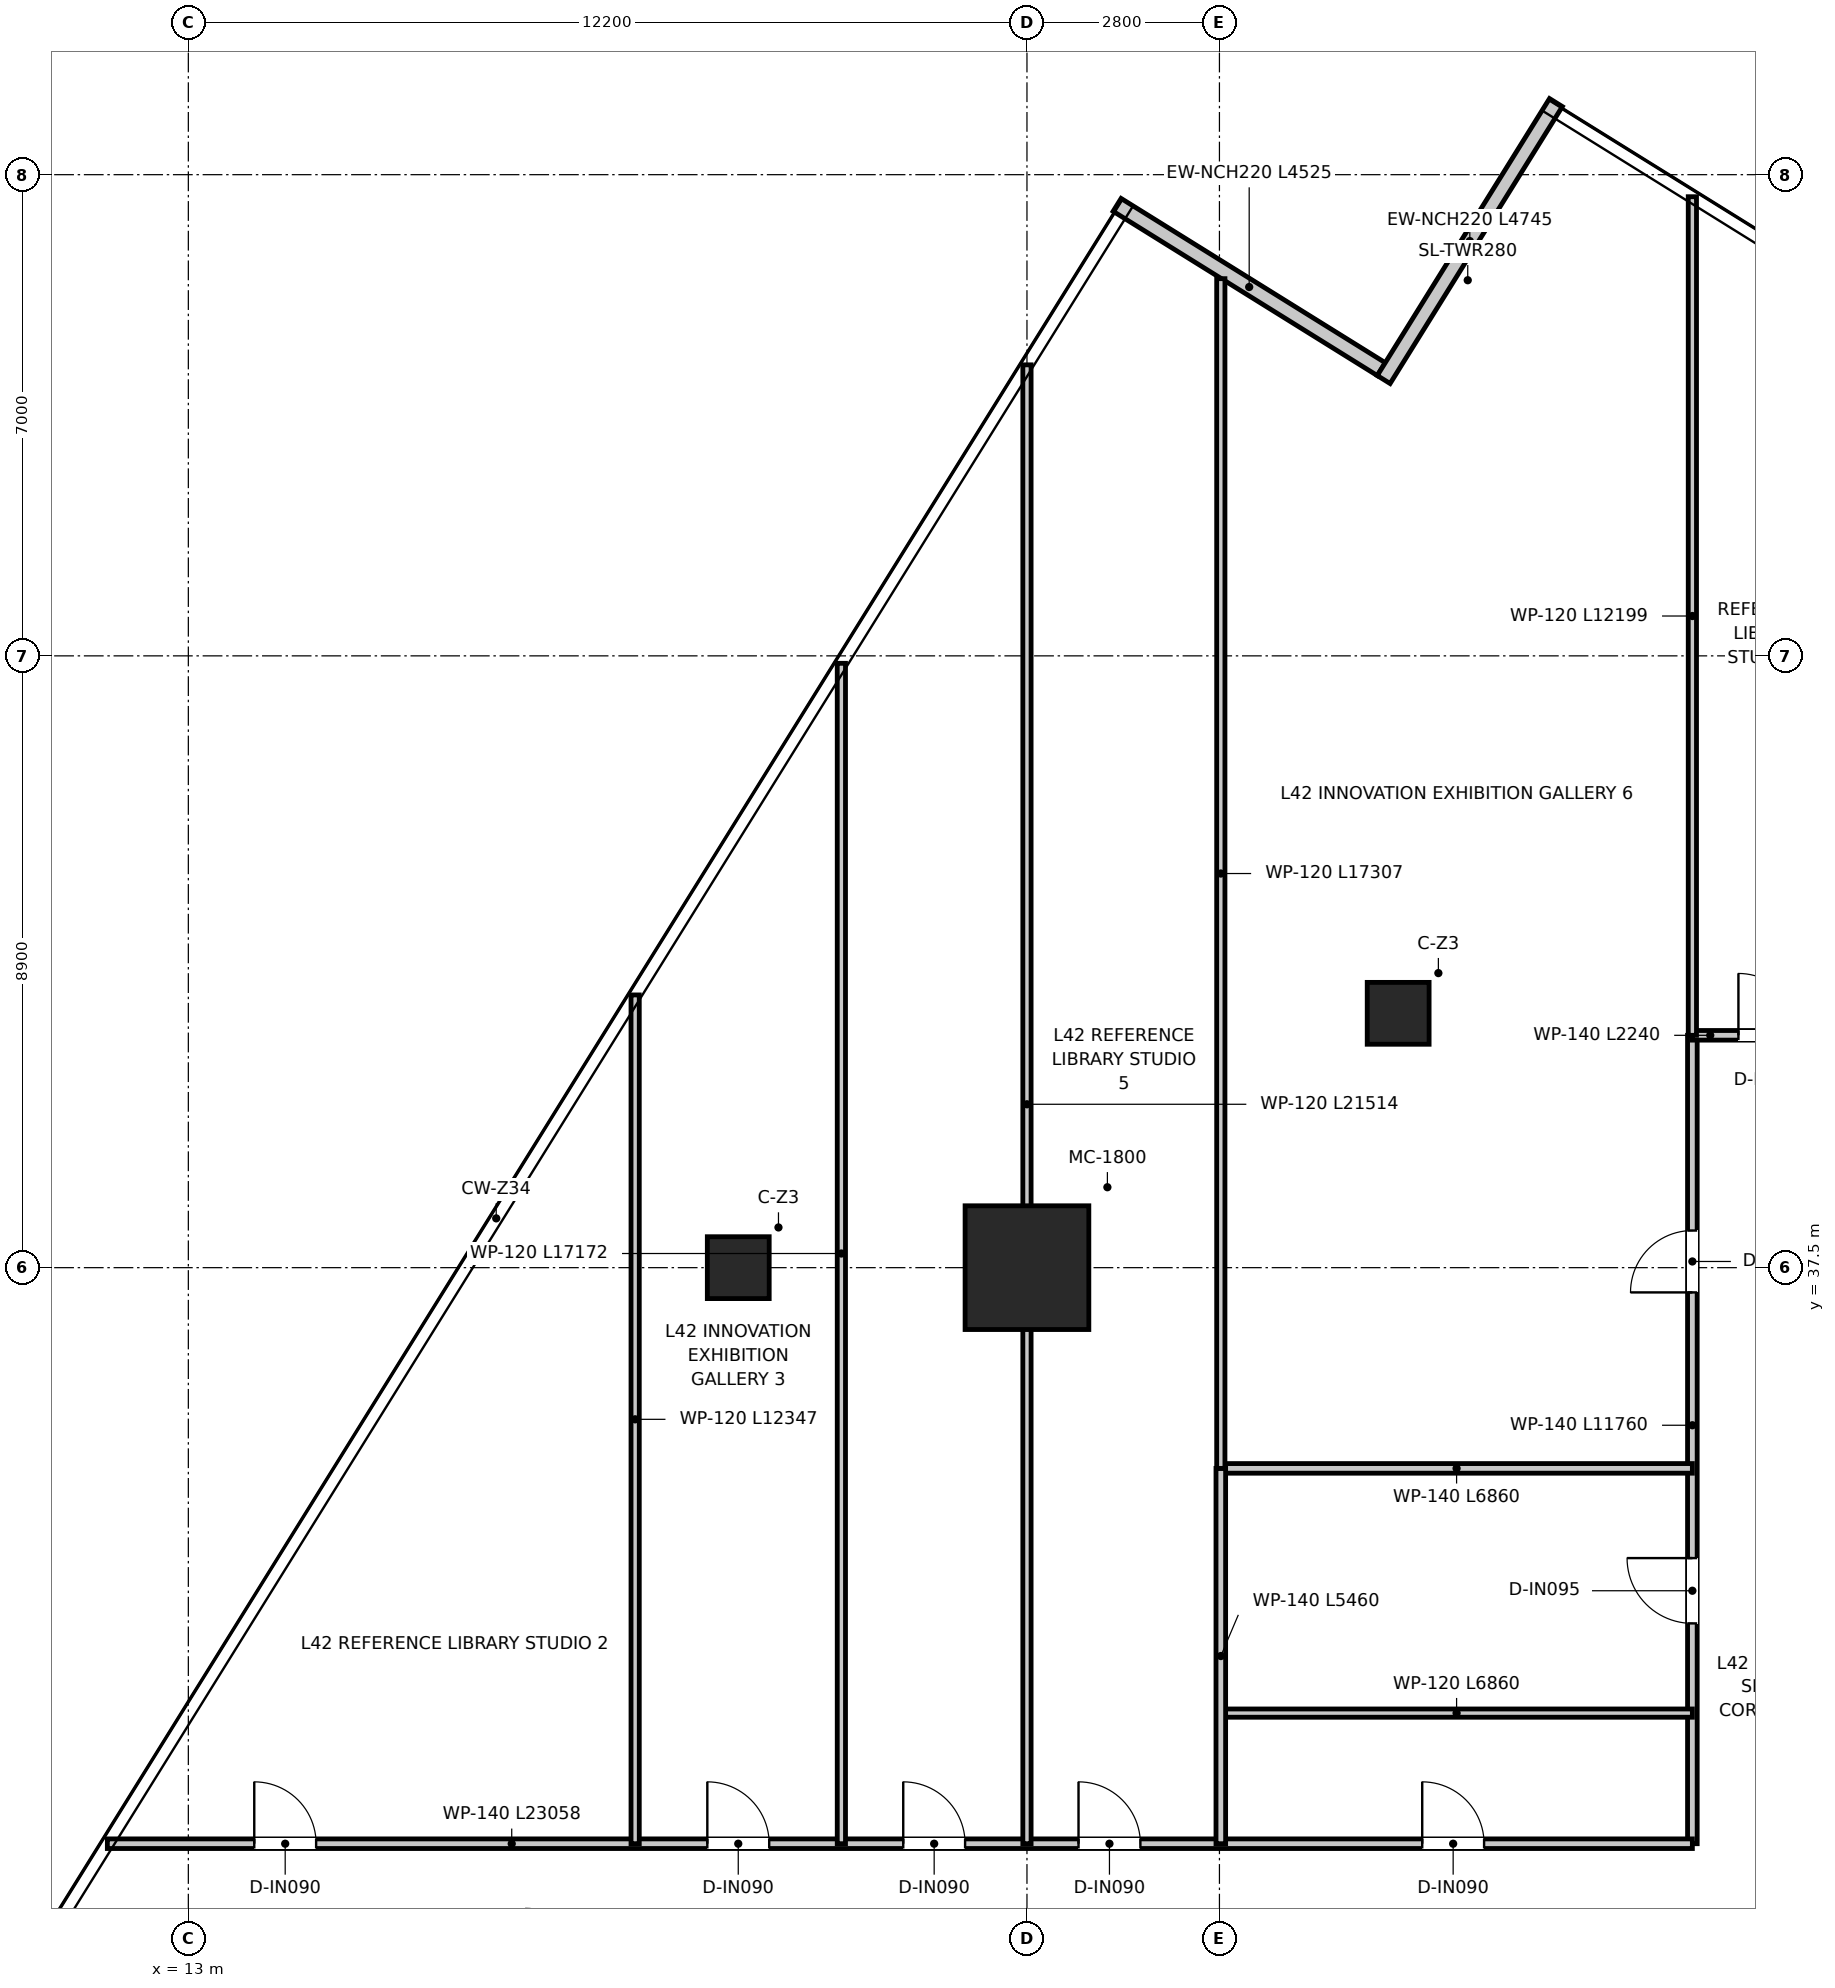
"""IFC4 building model, lengths in metres.
Left out: names, types, materials, properties, quantities, classifications, styles, units other than length and angle.
Written with IfcOpenShell. Run it as: python <this file> out.ifc"""

import sys

from ifc_helpers import new_model, si_unit, direction, frame, frame_2d, origin, origin_2d, place, context, subcontext, project, spatial, rectangle, extrude, source, transform, mapped, element, fill, save


model = new_model("IFC4")
c1 = context("Model", 3, precision=1e-05, world=origin(), true_north=direction((0.0, 1.0)))
c2 = subcontext(c1, "Body", "Model", "MODEL_VIEW")
j1 = project(units=[si_unit("LENGTHUNIT", "METRE"), si_unit("PLANEANGLEUNIT", "RADIAN")], contexts=[c1])
p1 = place(None, origin())
s1 = spatial("IfcSite", under=j1, at=p1, CompositionType="ELEMENT")
p2 = place(p1, origin())
s2 = spatial("IfcBuilding", under=s1, at=p2, CompositionType="ELEMENT")
p3 = place(p2, frame((0.0, 0.0, 173.85)))
s3 = spatial("IfcBuildingStorey", under=s2, at=p3, CompositionType="ELEMENT", Elevation=173.85)
m1 = source(origin(), c2, "Body", "SweptSolid", [
    extrude(rectangle(XDim=1.8, YDim=1.8, at=origin_2d()), origin(), (0.0, 0.0, 1.0), 3.95),
])
p4 = place(p3, frame((25.2, 37.5, 0.0), z_axis=(0.0, 0.0, 1.0), x_axis=(1.0, 0.0, 0.0)))
e1 = element("IfcColumn", 1, at=p4, inside=s3, PredefinedType="USERDEFINED", context=c2, shape_type="MappedRepresentation", body=[
    mapped(m1, transform((0.0, 0.0, 0.0), x_axis=(1.0, 0.0, 0.0), y_axis=(0.0, 1.0, 0.0), z_axis=(0.0, 0.0, 1.0), scale=1.0)),
])
m2 = source(origin(), c2, "Body", "SweptSolid", [
    extrude(rectangle(XDim=0.9, YDim=0.9, at=origin_2d()), origin(), (0.0, 0.0, 1.0), 3.95),
])
for number, where, z_axis, x_axis in (
    (2, (21.0, 37.5, 0.0), (0.0, 0.0, 1.0), (1.0, 0.0, 0.0)),
    (3, (30.6, 41.2, 0.0), (0.0, 0.0, 1.0), (1.0, 0.0, 0.0)),
):
    element("IfcColumn", number, at=place(p3, frame(where, z_axis=z_axis, x_axis=x_axis)), inside=s3, PredefinedType="COLUMN", context=c2, shape_type="MappedRepresentation", body=[
        mapped(m2, transform((0.0, 0.0, 0.0), x_axis=(1.0, 0.0, 0.0), y_axis=(0.0, 1.0, 0.0), z_axis=(0.0, 0.0, 1.0), scale=1.0)),
    ])
p5 = place(p3, frame((30.354, 50.571, 0.0), z_axis=(0.0, 0.0, 1.0), x_axis=(-0.849196398465, 0.528077150456, 0.0)))
e4 = element("IfcWall", 4, at=p5, inside=s3, PredefinedType="ELEMENTEDWALL", context=c2, shape_type="SweptSolid", body=[
    extrude(rectangle(XDim=4.525, YDim=0.22, at=frame_2d((2.263, 0.0))), origin(), (0.0, 0.0, 1.0), 3.67),
])
p6 = place(p3, frame((32.895, 54.449, 0.0), z_axis=(0.0, 0.0, 1.0), x_axis=(-0.528110642948, -0.849175570071, 0.0)))
e5 = element("IfcWall", 5, at=p6, inside=s3, PredefinedType="ELEMENTEDWALL", context=c2, shape_type="SweptSolid", body=[
    extrude(rectangle(XDim=4.745, YDim=0.22, at=frame_2d((2.373, 0.0))), origin(), (0.0, 0.0, 1.0), 3.67),
])
p7 = place(p3, frame((34.88, 29.12, 0.0), z_axis=(0.0, 0.0, 1.0), x_axis=(0.0, 1.0, 0.0)))
e6 = element("IfcWall", 6, at=p7, inside=s3, PredefinedType="PARTITIONING", context=c2, shape_type="SweptSolid", body=[
    extrude(rectangle(XDim=11.76, YDim=0.14, at=frame_2d((5.88, 0.0))), origin(), (0.0, 0.0, 1.0), 3.03),
])
p8 = place(p7, frame((3.205, 0.0, 0.0)))
e7 = element("IfcOpeningElement", 7, at=p8, cuts=e6, PredefinedType="OPENING", context=c2, shape_type="SweptSolid", body=[
    extrude(rectangle(XDim=0.95, YDim=2.1, at=frame_2d((0.475, 1.05))), frame((0.0, 0.08, 0.0), z_axis=(0.0, -1.0, 0.0), x_axis=(1.0, 0.0, 0.0)), (0.0, 0.0, 1.0), 0.16),
])
p9 = place(p7, frame((8.02, 0.0, 0.0)))
e8 = element("IfcOpeningElement", 8, at=p9, cuts=e6, PredefinedType="OPENING", context=c2, shape_type="SweptSolid", body=[
    extrude(rectangle(XDim=0.9, YDim=2.1, at=frame_2d((0.45, 1.05))), frame((0.0, 0.08, 0.0), z_axis=(0.0, -1.0, 0.0), x_axis=(1.0, 0.0, 0.0)), (0.0, 0.0, 1.0), 0.16),
])
p10 = place(p3, frame((34.88, 40.88, 0.0), z_axis=(0.0, 0.0, 1.0), x_axis=(1.0, 0.0, 0.0)))
e9 = element("IfcWall", 9, at=p10, inside=s3, PredefinedType="PARTITIONING", context=c2, shape_type="SweptSolid", body=[
    extrude(rectangle(XDim=2.24, YDim=0.14, at=frame_2d((1.12, 0.0))), origin(), (0.0, 0.0, 1.0), 3.67),
])
p11 = place(p10, frame((0.67, 0.0, 0.0)))
e10 = element("IfcOpeningElement", 10, at=p11, cuts=e9, PredefinedType="OPENING", context=c2, shape_type="SweptSolid", body=[
    extrude(rectangle(XDim=0.9, YDim=2.1, at=frame_2d((0.45, 1.05))), frame((0.0, 0.08, 0.0), z_axis=(0.0, -1.0, 0.0), x_axis=(1.0, 0.0, 0.0)), (0.0, 0.0, 1.0), 0.16),
])
p12 = place(p3, frame((11.822, 29.12, 0.0), z_axis=(0.0, 0.0, 1.0), x_axis=(1.0, 0.0, 0.0)))
e11 = element("IfcWall", 11, at=p12, inside=s3, PredefinedType="PARTITIONING", context=c2, shape_type="SweptSolid", body=[
    extrude(rectangle(XDim=23.058, YDim=0.14, at=frame_2d((11.529, 0.0))), origin(), (0.0, 0.0, 1.0), 3.03),
])
p13 = place(p12, frame((19.128, 0.0, 0.0)))
e12 = element("IfcOpeningElement", 12, at=p13, cuts=e11, PredefinedType="OPENING", context=c2, shape_type="SweptSolid", body=[
    extrude(rectangle(XDim=0.9, YDim=2.1, at=frame_2d((0.45, 1.05))), frame((0.0, 0.08, 0.0), z_axis=(0.0, -1.0, 0.0), x_axis=(1.0, 0.0, 0.0)), (0.0, 0.0, 1.0), 0.16),
])
p14 = place(p12, frame((2.137, 0.0, 0.0)))
e13 = element("IfcOpeningElement", 13, at=p14, cuts=e11, PredefinedType="OPENING", context=c2, shape_type="SweptSolid", body=[
    extrude(rectangle(XDim=0.9, YDim=2.1, at=frame_2d((0.45, 1.05))), frame((0.0, 0.08, 0.0), z_axis=(0.0, -1.0, 0.0), x_axis=(1.0, 0.0, 0.0)), (0.0, 0.0, 1.0), 0.16),
])
p15 = place(p12, frame((8.728, 0.0, 0.0)))
e14 = element("IfcOpeningElement", 14, at=p15, cuts=e11, PredefinedType="OPENING", context=c2, shape_type="SweptSolid", body=[
    extrude(rectangle(XDim=0.9, YDim=2.1, at=frame_2d((0.45, 1.05))), frame((0.0, 0.08, 0.0), z_axis=(0.0, -1.0, 0.0), x_axis=(1.0, 0.0, 0.0)), (0.0, 0.0, 1.0), 0.16),
])
p16 = place(p12, frame((11.578, 0.0, 0.0)))
e15 = element("IfcOpeningElement", 15, at=p16, cuts=e11, PredefinedType="OPENING", context=c2, shape_type="SweptSolid", body=[
    extrude(rectangle(XDim=0.9, YDim=2.1, at=frame_2d((0.45, 1.05))), frame((0.0, 0.08, 0.0), z_axis=(0.0, -1.0, 0.0), x_axis=(1.0, 0.0, 0.0)), (0.0, 0.0, 1.0), 0.16),
])
p17 = place(p12, frame((14.128, 0.0, 0.0)))
e16 = element("IfcOpeningElement", 16, at=p17, cuts=e11, PredefinedType="OPENING", context=c2, shape_type="SweptSolid", body=[
    extrude(rectangle(XDim=0.9, YDim=2.1, at=frame_2d((0.45, 1.05))), frame((0.0, 0.08, 0.0), z_axis=(0.0, -1.0, 0.0), x_axis=(1.0, 0.0, 0.0)), (0.0, 0.0, 1.0), 0.16),
])
p18 = place(p3, frame((28.02, 31.02, 0.0), z_axis=(0.0, 0.0, 1.0), x_axis=(1.0, 0.0, 0.0)))
e17 = element("IfcWall", 17, at=p18, inside=s3, PredefinedType="PARTITIONING", context=c2, shape_type="SweptSolid", body=[
    extrude(rectangle(XDim=6.86, YDim=0.12, at=frame_2d((3.43, 0.0))), origin(), (0.0, 0.0, 1.0), 3.08),
])
p19 = place(p3, frame((28.02, 34.58, 0.0), z_axis=(0.0, 0.0, 1.0), x_axis=(1.0, 0.0, 0.0)))
e18 = element("IfcWall", 18, at=p19, inside=s3, PredefinedType="PARTITIONING", context=c2, shape_type="SweptSolid", body=[
    extrude(rectangle(XDim=6.86, YDim=0.14, at=frame_2d((3.43, 0.0))), origin(), (0.0, 0.0, 1.0), 3.08),
])
p20 = place(p3, frame((28.02, 29.12, 0.0), z_axis=(0.0, 0.0, 1.0), x_axis=(0.0, 1.0, 0.0)))
e19 = element("IfcWall", 19, at=p20, inside=s3, PredefinedType="PARTITIONING", context=c2, shape_type="SweptSolid", body=[
    extrude(rectangle(XDim=5.46, YDim=0.14, at=frame_2d((2.73, 0.0))), origin(), (0.0, 0.0, 1.0), 3.31),
])
p21 = place(p3, frame((34.88, 40.88, 0.0), z_axis=(0.0, 0.0, 1.0), x_axis=(0.0, 1.0, 0.0)))
e20 = element("IfcWall", 20, at=p21, inside=s3, PredefinedType="PARTITIONING", context=c2, shape_type="SweptSolid", body=[
    extrude(rectangle(XDim=12.199, YDim=0.12, at=frame_2d((6.1, 0.0))), origin(), (0.0, 0.0, 1.0), 3.28),
])
p22 = place(p3, frame((19.5, 29.12, 0.0), z_axis=(0.0, 0.0, 1.0), x_axis=(0.0, 1.0, 0.0)))
e21 = element("IfcWall", 21, at=p22, inside=s3, PredefinedType="PARTITIONING", context=c2, shape_type="SweptSolid", body=[
    extrude(rectangle(XDim=12.347, YDim=0.12, at=frame_2d((6.174, 0.0))), origin(), (0.0, 0.0, 1.0), 3.67),
])
p23 = place(p3, frame((22.5, 29.12, 0.0), z_axis=(0.0, 0.0, 1.0), x_axis=(0.0, 1.0, 0.0)))
e22 = element("IfcWall", 22, at=p23, inside=s3, PredefinedType="PARTITIONING", context=c2, shape_type="SweptSolid", body=[
    extrude(rectangle(XDim=17.172, YDim=0.12, at=frame_2d((8.586, 0.0))), origin(), (0.0, 0.0, 1.0), 3.08),
])
p24 = place(p3, frame((25.2, 29.12, 0.0), z_axis=(0.0, 0.0, 1.0), x_axis=(0.0, 1.0, 0.0)))
e23 = element("IfcWall", 23, at=p24, inside=s3, PredefinedType="PARTITIONING", context=c2, shape_type="SweptSolid", body=[
    extrude(rectangle(XDim=21.514, YDim=0.12, at=frame_2d((10.757, 0.0))), origin(), (0.0, 0.0, 1.0), 3.03),
])
p25 = place(p3, frame((28.02, 34.58, 0.0), z_axis=(0.0, 0.0, 1.0), x_axis=(0.0, 1.0, 0.0)))
e24 = element("IfcWall", 24, at=p25, inside=s3, PredefinedType="PARTITIONING", context=c2, shape_type="SweptSolid", body=[
    extrude(rectangle(XDim=17.307, YDim=0.12, at=frame_2d((8.654, 0.0))), origin(), (0.0, 0.0, 1.0), 3.03),
])
p26 = place(p13, origin())
e25 = element("IfcDoor", 25, at=p26, inside=s3, OperationType="SINGLE_SWING_LEFT", PredefinedType="DOOR", context=c2, shape_type="SweptSolid", body=[
    extrude(rectangle(XDim=0.9, YDim=2.1, at=frame_2d((0.45, 1.05))), frame((0.0, 0.025, 0.0), z_axis=(0.0, -1.0, 0.0), x_axis=(1.0, 0.0, 0.0)), (0.0, 0.0, 1.0), 0.05),
])
fill(e12, e25)
p27 = place(p8, origin())
e26 = element("IfcDoor", 26, at=p27, inside=s3, OperationType="SINGLE_SWING_RIGHT", PredefinedType="DOOR", context=c2, shape_type="SweptSolid", body=[
    extrude(rectangle(XDim=0.95, YDim=2.1, at=frame_2d((0.475, 1.05))), frame((0.0, 0.025, 0.0), z_axis=(0.0, -1.0, 0.0), x_axis=(1.0, 0.0, 0.0)), (0.0, 0.0, 1.0), 0.05),
])
fill(e7, e26)
p28 = place(p11, origin())
e27 = element("IfcDoor", 27, at=p28, inside=s3, OperationType="SINGLE_SWING_LEFT", PredefinedType="DOOR", context=c2, shape_type="SweptSolid", body=[
    extrude(rectangle(XDim=0.9, YDim=2.1, at=frame_2d((0.45, 1.05))), frame((0.0, 0.025, 0.0), z_axis=(0.0, -1.0, 0.0), x_axis=(1.0, 0.0, 0.0)), (0.0, 0.0, 1.0), 0.05),
])
fill(e10, e27)
p29 = place(p14, origin())
e28 = element("IfcDoor", 28, at=p29, inside=s3, OperationType="SINGLE_SWING_LEFT", PredefinedType="DOOR", context=c2, shape_type="SweptSolid", body=[
    extrude(rectangle(XDim=0.9, YDim=2.1, at=frame_2d((0.45, 1.05))), frame((0.0, 0.025, 0.0), z_axis=(0.0, -1.0, 0.0), x_axis=(1.0, 0.0, 0.0)), (0.0, 0.0, 1.0), 0.05),
])
fill(e13, e28)
p30 = place(p15, origin())
e29 = element("IfcDoor", 29, at=p30, inside=s3, OperationType="SINGLE_SWING_LEFT", PredefinedType="DOOR", context=c2, shape_type="SweptSolid", body=[
    extrude(rectangle(XDim=0.9, YDim=2.1, at=frame_2d((0.45, 1.05))), frame((0.0, 0.025, 0.0), z_axis=(0.0, -1.0, 0.0), x_axis=(1.0, 0.0, 0.0)), (0.0, 0.0, 1.0), 0.05),
])
fill(e14, e29)
p31 = place(p16, origin())
e30 = element("IfcDoor", 30, at=p31, inside=s3, OperationType="SINGLE_SWING_LEFT", PredefinedType="DOOR", context=c2, shape_type="SweptSolid", body=[
    extrude(rectangle(XDim=0.9, YDim=2.1, at=frame_2d((0.45, 1.05))), frame((0.0, 0.025, 0.0), z_axis=(0.0, -1.0, 0.0), x_axis=(1.0, 0.0, 0.0)), (0.0, 0.0, 1.0), 0.05),
])
fill(e15, e30)
p32 = place(p17, origin())
e31 = element("IfcDoor", 31, at=p32, inside=s3, OperationType="SINGLE_SWING_LEFT", PredefinedType="DOOR", context=c2, shape_type="SweptSolid", body=[
    extrude(rectangle(XDim=0.9, YDim=2.1, at=frame_2d((0.45, 1.05))), frame((0.0, 0.025, 0.0), z_axis=(0.0, -1.0, 0.0), x_axis=(1.0, 0.0, 0.0)), (0.0, 0.0, 1.0), 0.05),
])
fill(e16, e31)
p33 = place(p9, origin())
e32 = element("IfcDoor", 32, at=p33, inside=s3, OperationType="SINGLE_SWING_LEFT", PredefinedType="DOOR", context=c2, shape_type="SweptSolid", body=[
    extrude(rectangle(XDim=0.9, YDim=2.1, at=frame_2d((0.45, 1.05))), frame((0.0, 0.025, 0.0), z_axis=(0.0, -1.0, 0.0), x_axis=(1.0, 0.0, 0.0)), (0.0, 0.0, 1.0), 0.05),
])
fill(e8, e32)
save(model, sys.argv[1])
